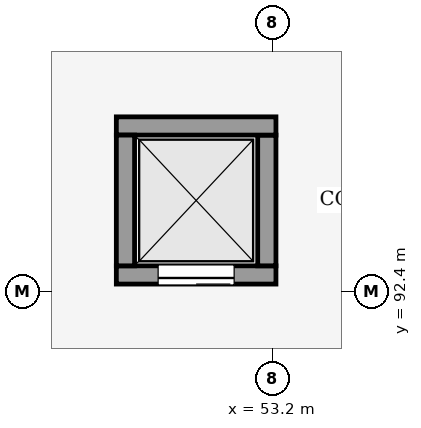
"""IFC4 building model, lengths in metres.
Left out: names, types, materials, properties, quantities, classifications, styles, units other than length and angle.
Written with IfcOpenShell. Run it as: python <this file> out.ifc"""

import sys

from ifc_helpers import new_model, si_unit, direction, frame, frame_2d, origin, place, context, subcontext, project, spatial, rectangle, extrude, element, fill, save


model = new_model("IFC4")
c1 = context("Model", 3, precision=1e-05, world=origin(), true_north=direction((0.0, 1.0)))
c2 = subcontext(c1, "Body", "Model", "MODEL_VIEW")
j1 = project(units=[si_unit("LENGTHUNIT", "METRE"), si_unit("PLANEANGLEUNIT", "RADIAN")], contexts=[c1])
p1 = place(None, origin())
s1 = spatial("IfcSite", under=j1, at=p1, CompositionType="ELEMENT")
p2 = place(p1, origin())
s2 = spatial("IfcBuilding", under=s1, at=p2, CompositionType="ELEMENT")
p3 = place(p2, frame((0.0, 0.0, 13.2)))
s3 = spatial("IfcBuildingStorey", under=s2, at=p3, CompositionType="ELEMENT", Elevation=13.2)
p4 = place(p3, frame((53.25, 92.62, 0.0), z_axis=(0.0, 0.0, 1.0), x_axis=(-1.0, 0.0, 0.0)))
e1 = element("IfcWall", 1, at=p4, inside=s3, PredefinedType="SHEAR", context=c2, shape_type="SweptSolid", body=[
    extrude(rectangle(XDim=2.1, YDim=0.24, at=frame_2d((1.05, 0.0))), origin(), (0.0, 0.0, 1.0), 4.05),
])
p5 = place(p4, frame((0.55, 0.0, 0.0)))
e2 = element("IfcOpeningElement", 2, at=p5, cuts=e1, PredefinedType="OPENING", context=c2, shape_type="SweptSolid", body=[
    extrude(rectangle(XDim=1.0, YDim=2.15, at=frame_2d((0.5, 1.075))), frame((0.0, 0.13, 0.0), z_axis=(0.0, -1.0, 0.0), x_axis=(1.0, 0.0, 0.0)), (0.0, 0.0, 1.0), 0.26),
])
p6 = place(p3, frame((53.13, 94.46, 0.0), z_axis=(0.0, 0.0, 1.0), x_axis=(0.0, -1.0, 0.0)))
e3 = element("IfcWall", 3, at=p6, inside=s3, PredefinedType="SHEAR", context=c2, shape_type="SweptSolid", body=[
    extrude(rectangle(XDim=1.72, YDim=0.24, at=frame_2d((0.86, 0.0))), origin(), (0.0, 0.0, 1.0), 4.05),
])
p7 = place(p3, frame((51.15, 94.58, 0.0), z_axis=(0.0, 0.0, 1.0), x_axis=(1.0, 0.0, 0.0)))
e4 = element("IfcWall", 4, at=p7, inside=s3, PredefinedType="SHEAR", context=c2, shape_type="SweptSolid", body=[
    extrude(rectangle(XDim=2.1, YDim=0.24, at=frame_2d((1.05, 0.0))), origin(), (0.0, 0.0, 1.0), 4.05),
])
p8 = place(p3, frame((51.27, 92.74, 0.0), z_axis=(0.0, 0.0, 1.0), x_axis=(0.0, 1.0, 0.0)))
e5 = element("IfcWall", 5, at=p8, inside=s3, PredefinedType="SHEAR", context=c2, shape_type="SweptSolid", body=[
    extrude(rectangle(XDim=1.72, YDim=0.24, at=frame_2d((0.86, 0.0))), origin(), (0.0, 0.0, 1.0), 4.05),
])
p9 = place(p5, origin())
e6 = element("IfcDoor", 6, at=p9, inside=s3, OperationType="SLIDING_TO_LEFT", PredefinedType="DOOR", context=c2, shape_type="SweptSolid", body=[
    extrude(rectangle(XDim=1.0, YDim=2.15, at=frame_2d((0.5, 1.075))), frame((0.0, 0.025, 0.0), z_axis=(0.0, -1.0, 0.0), x_axis=(1.0, 0.0, 0.0)), (0.0, 0.0, 1.0), 0.05),
])
fill(e2, e6)
save(model, sys.argv[1])
